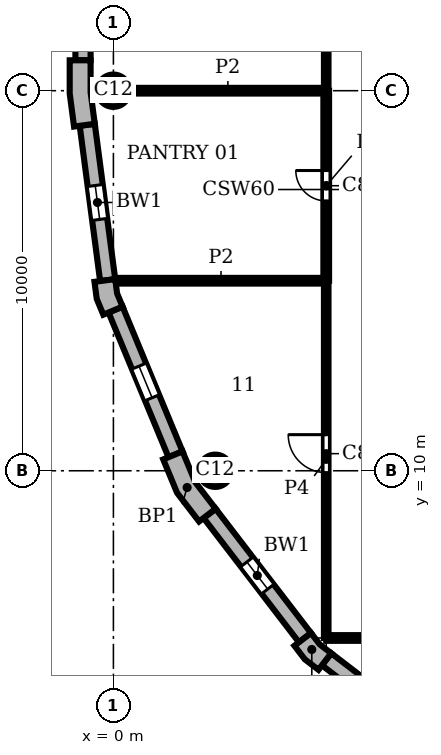
"""IFC4 building model, lengths in metres.
Left out: names, types, materials, properties, quantities, classifications, styles, units other than length and angle.
Written with IfcOpenShell. Run it as: python <this file> out.ifc"""

import sys

from ifc_helpers import new_model, si_unit, direction, frame, frame_2d, origin, origin_2d, place, context, subcontext, project, spatial, polyline, rectangle, circle, outline, extrude, element, fill, save


model = new_model("IFC4")
c1 = context("Model", 3, precision=1e-05, world=origin(), true_north=direction((0.0, 1.0)))
c2 = subcontext(c1, "Body", "Model", "MODEL_VIEW")
j1 = project(units=[si_unit("LENGTHUNIT", "METRE"), si_unit("PLANEANGLEUNIT", "RADIAN")], contexts=[c1])
p1 = place(None, origin())
s1 = spatial("IfcSite", under=j1, at=p1, CompositionType="ELEMENT")
p2 = place(p1, origin())
s2 = spatial("IfcBuilding", under=s1, at=p2, CompositionType="ELEMENT")
p3 = place(p2, frame((0.0, 0.0, 317.7)))
s3 = spatial("IfcBuildingStorey", under=s2, at=p3, CompositionType="ELEMENT", Elevation=317.7)
for number, where, z_axis, x_axis in (
    (1, (0.0, 20.0, 0.0), (0.0, 0.0, 1.0), (1.0, 0.0, 0.0)),
    (2, (2.679, 10.0, 0.0), (0.0, 0.0, 1.0), (1.0, 0.0, 0.0)),
):
    element("IfcColumn", number, at=place(p3, frame(where, z_axis=z_axis, x_axis=x_axis)), inside=s3, PredefinedType="COLUMN", context=c2, shape_type="SweptSolid", body=[
        extrude(circle(Radius=0.425, at=origin_2d()), origin(), (0.0, 0.0, 1.0), 3.9),
    ])
p4 = place(p3, origin())
e3 = element("IfcWall", 3, at=p4, inside=s3, PredefinedType="SOLIDWALL", context=c2, shape_type="SweptSolid", body=[
    extrude(outline(polyline([(-1.0, 20.8), (-1.15, 20.8), (-1.15, 19.925), (-1.036, 19.057), (-0.887, 19.076), (-0.49, 19.128), (-0.6, 19.961), (-0.6, 20.8), (-1.0, 20.8)])), origin(), (0.0, 0.0, 1.0), 3.9),
])
e4 = element("IfcWall", 4, at=p4, inside=s3, PredefinedType="SOLIDWALL", context=c2, shape_type="SweptSolid", body=[
    extrude(outline(polyline([(-0.349, 14.99), (-0.498, 14.971), (-0.439, 14.523), (-0.266, 14.106), (-0.128, 14.164), (0.242, 14.317), (0.097, 14.667), (0.047, 15.043), (-0.349, 14.99)])), origin(), (0.0, 0.0, 1.0), 3.9),
])
e5 = element("IfcWall", 5, at=p4, inside=s3, PredefinedType="SOLIDWALL", context=c2, shape_type="SweptSolid", body=[
    extrude(outline(polyline([(1.449, 10.356), (1.311, 10.299), (1.675, 9.42), (2.254, 8.665), (2.373, 8.757), (2.69, 9.0), (2.155, 9.698), (1.819, 10.51), (1.449, 10.356)])), origin(), (0.0, 0.0, 1.0), 3.9),
])
e6 = element("IfcWall", 6, at=p4, inside=s3, PredefinedType="SOLIDWALL", context=c2, shape_type="SweptSolid", body=[
    extrude(outline(polyline([(4.882, 5.487), (4.763, 5.396), (5.038, 5.038), (5.396, 4.763), (5.487, 4.882), (5.731, 5.199), (5.43, 5.43), (5.199, 5.731), (4.882, 5.487)])), origin(), (0.0, 0.0, 1.0), 3.9),
])
p5 = place(p3, frame((-0.8, 39.2, 0.0), z_axis=(0.0, 0.0, 1.0), x_axis=(0.0, -1.0, 0.0)))
e7 = element("IfcWall", 7, at=p5, inside=s3, PredefinedType="SOLIDWALL", context=c2, shape_type="SweptSolid", body=[
    extrude(rectangle(XDim=18.4, YDim=0.4, at=frame_2d((9.2, 0.0))), origin(), (0.0, 0.0, 1.0), 3.9),
])
p6 = place(p5, frame((3.75, 0.0, 0.9)))
e8 = element("IfcOpeningElement", 8, at=p6, cuts=e7, PredefinedType="OPENING", context=c2, shape_type="SweptSolid", body=[
    extrude(rectangle(XDim=0.9, YDim=2.35, at=frame_2d((0.45, 1.175))), frame((0.0, 0.21, 0.0), z_axis=(0.0, -1.0, 0.0), x_axis=(1.0, 0.0, 0.0)), (0.0, 0.0, 1.0), 0.42),
])
p7 = place(p5, frame((13.75, 0.0, 0.9)))
e9 = element("IfcOpeningElement", 9, at=p7, cuts=e7, PredefinedType="OPENING", context=c2, shape_type="SweptSolid", body=[
    extrude(rectangle(XDim=0.9, YDim=2.35, at=frame_2d((0.45, 1.175))), frame((0.0, 0.21, 0.0), z_axis=(0.0, -1.0, 0.0), x_axis=(1.0, 0.0, 0.0)), (0.0, 0.0, 1.0), 0.42),
])
p8 = place(p3, frame((-0.689, 19.102, 0.0), z_axis=(0.0, 0.0, 1.0), x_axis=(0.130514280502, -0.991446429508, 0.0)))
e10 = element("IfcWall", 10, at=p8, inside=s3, PredefinedType="SOLIDWALL", context=c2, shape_type="SweptSolid", body=[
    extrude(rectangle(XDim=4.121, YDim=0.4, at=frame_2d((2.061, 0.0))), origin(), (0.0, 0.0, 1.0), 3.9),
])
p9 = place(p8, frame((1.611, 0.0, 0.9)))
e11 = element("IfcOpeningElement", 11, at=p9, cuts=e10, PredefinedType="OPENING", context=c2, shape_type="SweptSolid", body=[
    extrude(rectangle(XDim=0.9, YDim=2.35, at=frame_2d((0.45, 1.175))), frame((0.0, 0.21, 0.0), z_axis=(0.0, -1.0, 0.0), x_axis=(1.0, 0.0, 0.0)), (0.0, 0.0, 1.0), 0.42),
])
p10 = place(p3, frame((0.057, 14.24, 0.0), z_axis=(0.0, 0.0, 1.0), x_axis=(0.382721546029, -0.923863744394, 0.0)))
e12 = element("IfcWall", 12, at=p10, inside=s3, PredefinedType="SOLIDWALL", context=c2, shape_type="SweptSolid", body=[
    extrude(rectangle(XDim=4.121, YDim=0.4, at=frame_2d((2.061, 0.0))), origin(), (0.0, 0.0, 1.0), 3.9),
])
p11 = place(p10, frame((1.611, 0.0, 0.9)))
e13 = element("IfcOpeningElement", 13, at=p11, cuts=e12, PredefinedType="OPENING", context=c2, shape_type="SweptSolid", body=[
    extrude(rectangle(XDim=0.9, YDim=2.35, at=frame_2d((0.45, 1.175))), frame((0.0, 0.21, 0.0), z_axis=(0.0, -1.0, 0.0), x_axis=(1.0, 0.0, 0.0)), (0.0, 0.0, 1.0), 0.42),
])
p12 = place(p3, frame((2.532, 8.878, 0.0), z_axis=(0.0, 0.0, 1.0), x_axis=(0.608759824817, -0.793354571229, 0.0)))
e14 = element("IfcWall", 14, at=p12, inside=s3, PredefinedType="SOLIDWALL", context=c2, shape_type="SweptSolid", body=[
    extrude(rectangle(XDim=4.121, YDim=0.4, at=frame_2d((2.061, 0.0))), origin(), (0.0, 0.0, 1.0), 3.9),
])
p13 = place(p12, frame((1.611, 0.0, 0.9)))
e15 = element("IfcOpeningElement", 15, at=p13, cuts=e14, PredefinedType="OPENING", context=c2, shape_type="SweptSolid", body=[
    extrude(rectangle(XDim=0.9, YDim=2.35, at=frame_2d((0.45, 1.175))), frame((0.0, 0.21, 0.0), z_axis=(0.0, -1.0, 0.0), x_axis=(1.0, 0.0, 0.0)), (0.0, 0.0, 1.0), 0.42),
])
p14 = place(p3, frame((5.609, 5.041, 0.0), z_axis=(0.0, 0.0, 1.0), x_axis=(0.793354571229, -0.608759824817, 0.0)))
e16 = element("IfcWall", 16, at=p14, inside=s3, PredefinedType="SOLIDWALL", context=c2, shape_type="SweptSolid", body=[
    extrude(rectangle(XDim=4.121, YDim=0.4, at=frame_2d((2.061, 0.0))), origin(), (0.0, 0.0, 1.0), 3.9),
])
p15 = place(p14, frame((1.611, 0.0, 0.9)))
e17 = element("IfcOpeningElement", 17, at=p15, cuts=e16, PredefinedType="OPENING", context=c2, shape_type="SweptSolid", body=[
    extrude(rectangle(XDim=0.9, YDim=2.35, at=frame_2d((0.45, 1.175))), frame((0.0, 0.21, 0.0), z_axis=(0.0, -1.0, 0.0), x_axis=(1.0, 0.0, 0.0)), (0.0, 0.0, 1.0), 0.42),
])
p16 = place(p3, frame((5.6, 15.0, 0.0), z_axis=(0.0, 0.0, 1.0), x_axis=(0.0, 1.0, 0.0)))
e18 = element("IfcWall", 18, at=p16, inside=s3, PredefinedType="PARTITIONING", context=c2, shape_type="SweptSolid", body=[
    extrude(rectangle(XDim=5.0, YDim=0.15, at=frame_2d((2.5, 0.0))), origin(), (0.0, 0.0, 1.0), 3.58),
])
p17 = place(p16, frame((2.1, 0.0, 0.0)))
e19 = element("IfcOpeningElement", 19, at=p17, cuts=e18, PredefinedType="OPENING", context=c2, shape_type="SweptSolid", body=[
    extrude(rectangle(XDim=0.8, YDim=2.1, at=frame_2d((0.4, 1.05))), frame((0.0, 0.085, 0.0), z_axis=(0.0, -1.0, 0.0), x_axis=(1.0, 0.0, 0.0)), (0.0, 0.0, 1.0), 0.17),
])
p18 = place(p3, frame((5.6, 5.6, 0.0), z_axis=(0.0, 0.0, 1.0), x_axis=(1.0, 0.0, 0.0)))
e20 = element("IfcWall", 20, at=p18, inside=s3, PredefinedType="PARTITIONING", context=c2, shape_type="SweptSolid", body=[
    extrude(rectangle(XDim=14.4, YDim=0.15, at=frame_2d((7.2, 0.0))), origin(), (0.0, 0.0, 1.0), 3.58),
])
p19 = place(p18, frame((4.1, 0.0, 0.0)))
e21 = element("IfcOpeningElement", 21, at=p19, cuts=e20, PredefinedType="OPENING", context=c2, shape_type="SweptSolid", body=[
    extrude(rectangle(XDim=1.0, YDim=2.1, at=frame_2d((0.5, 1.05))), frame((0.0, 0.085, 0.0), z_axis=(0.0, -1.0, 0.0), x_axis=(1.0, 0.0, 0.0)), (0.0, 0.0, 1.0), 0.17),
])
p20 = place(p18, frame((11.25, 0.0, 0.0)))
e22 = element("IfcOpeningElement", 22, at=p20, cuts=e20, PredefinedType="OPENING", context=c2, shape_type="SweptSolid", body=[
    extrude(rectangle(XDim=1.1, YDim=2.1, at=frame_2d((0.55, 1.05))), frame((0.0, 0.085, 0.0), z_axis=(0.0, -1.0, 0.0), x_axis=(1.0, 0.0, 0.0)), (0.0, 0.0, 1.0), 0.17),
])
p21 = place(p3, frame((0.063, 15.0, 0.0), z_axis=(0.0, 0.0, 1.0), x_axis=(1.0, 0.0, 0.0)))
e23 = element("IfcWall", 23, at=p21, inside=s3, PredefinedType="PARTITIONING", context=c2, shape_type="SweptSolid", body=[
    extrude(rectangle(XDim=5.537, YDim=0.15, at=frame_2d((2.769, 0.0))), origin(), (0.0, 0.0, 1.0), 3.58),
])
p22 = place(p3, frame((0.425, 20.0, 0.0), z_axis=(0.0, 0.0, 1.0), x_axis=(1.0, 0.0, 0.0)))
e24 = element("IfcWall", 24, at=p22, inside=s3, PredefinedType="PARTITIONING", context=c2, shape_type="SweptSolid", body=[
    extrude(rectangle(XDim=5.175, YDim=0.15, at=frame_2d((2.587, 0.0))), origin(), (0.0, 0.0, 1.0), 3.58),
])
p23 = place(p3, frame((5.6, 5.6, 0.0), z_axis=(0.0, 0.0, 1.0), x_axis=(0.0, 1.0, 0.0)))
e25 = element("IfcWall", 25, at=p23, inside=s3, PredefinedType="PARTITIONING", context=c2, shape_type="SweptSolid", body=[
    extrude(rectangle(XDim=9.4, YDim=0.12, at=frame_2d((4.7, 0.0))), origin(), (0.0, 0.0, 1.0), 3.58),
])
p24 = place(p23, frame((4.35, 0.0, 0.0)))
e26 = element("IfcOpeningElement", 26, at=p24, cuts=e25, PredefinedType="OPENING", context=c2, shape_type="SweptSolid", body=[
    extrude(rectangle(XDim=1.0, YDim=2.1, at=frame_2d((0.5, 1.05))), frame((0.0, 0.07, 0.0), z_axis=(0.0, -1.0, 0.0), x_axis=(1.0, 0.0, 0.0)), (0.0, 0.0, 1.0), 0.14),
])
p25 = place(p3, frame((5.6, 20.0, 0.0), z_axis=(0.0, 0.0, 1.0), x_axis=(0.0, 1.0, 0.0)))
e27 = element("IfcWall", 27, at=p25, inside=s3, PredefinedType="PARTITIONING", context=c2, shape_type="SweptSolid", body=[
    extrude(rectangle(XDim=8.0, YDim=0.12, at=frame_2d((4.0, 0.0))), origin(), (0.0, 0.0, 1.0), 3.58),
])
p26 = place(p9, origin())
e28 = element("IfcWindow", 28, at=p26, inside=s3, PartitioningType="SINGLE_PANEL", PredefinedType="WINDOW", context=c2, shape_type="SweptSolid", body=[
    extrude(rectangle(XDim=0.9, YDim=2.35, at=frame_2d((0.45, 1.175))), frame((0.0, 0.16, 0.0), z_axis=(0.0, -1.0, 0.0), x_axis=(1.0, 0.0, 0.0)), (0.0, 0.0, 1.0), 0.06),
])
fill(e11, e28)
p27 = place(p11, origin())
e29 = element("IfcWindow", 29, at=p27, inside=s3, PartitioningType="SINGLE_PANEL", PredefinedType="WINDOW", context=c2, shape_type="SweptSolid", body=[
    extrude(rectangle(XDim=0.9, YDim=2.35, at=frame_2d((0.45, 1.175))), frame((0.0, 0.16, 0.0), z_axis=(0.0, -1.0, 0.0), x_axis=(1.0, 0.0, 0.0)), (0.0, 0.0, 1.0), 0.06),
])
fill(e13, e29)
p28 = place(p13, origin())
e30 = element("IfcWindow", 30, at=p28, inside=s3, PartitioningType="SINGLE_PANEL", PredefinedType="WINDOW", context=c2, shape_type="SweptSolid", body=[
    extrude(rectangle(XDim=0.9, YDim=2.35, at=frame_2d((0.45, 1.175))), frame((0.0, 0.16, 0.0), z_axis=(0.0, -1.0, 0.0), x_axis=(1.0, 0.0, 0.0)), (0.0, 0.0, 1.0), 0.06),
])
fill(e15, e30)
p29 = place(p24, origin())
e31 = element("IfcDoor", 31, at=p29, inside=s3, OperationType="SINGLE_SWING_RIGHT", PredefinedType="DOOR", context=c2, shape_type="SweptSolid", body=[
    extrude(rectangle(XDim=1.0, YDim=2.1, at=frame_2d((0.5, 1.05))), frame((0.0, 0.025, 0.0), z_axis=(0.0, -1.0, 0.0), x_axis=(1.0, 0.0, 0.0)), (0.0, 0.0, 1.0), 0.05),
])
fill(e26, e31)
p30 = place(p17, origin())
e32 = element("IfcDoor", 32, at=p30, inside=s3, OperationType="SINGLE_SWING_RIGHT", PredefinedType="DOOR", context=c2, shape_type="SweptSolid", body=[
    extrude(rectangle(XDim=0.8, YDim=2.1, at=frame_2d((0.4, 1.05))), frame((0.0, 0.025, 0.0), z_axis=(0.0, -1.0, 0.0), x_axis=(1.0, 0.0, 0.0)), (0.0, 0.0, 1.0), 0.05),
])
fill(e19, e32)
save(model, sys.argv[1])
